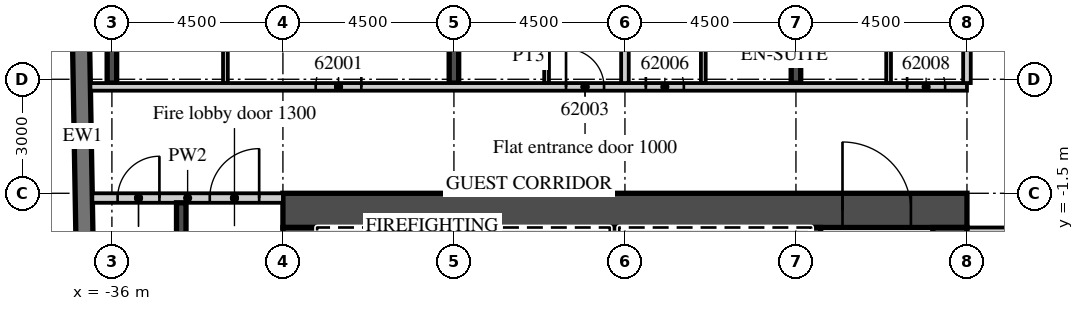
"""IFC4 building model, lengths in metres.
Left out: names, types, materials, properties, quantities, classifications, styles, units other than length and angle.
Written with IfcOpenShell. Run it as: python <this file> out.ifc"""

import sys

from ifc_helpers import new_model, si_unit, direction, frame, frame_2d, origin, place, context, subcontext, project, spatial, rectangle, extrude, element, fill, save


model = new_model("IFC4")
c1 = context("Model", 3, precision=1e-05, world=origin(), true_north=direction((0.0, 1.0)))
c2 = subcontext(c1, "Body", "Model", "MODEL_VIEW")
j1 = project(units=[si_unit("LENGTHUNIT", "METRE"), si_unit("PLANEANGLEUNIT", "RADIAN")], contexts=[c1])
p1 = place(None, origin())
s1 = spatial("IfcSite", under=j1, at=p1, CompositionType="ELEMENT")
p2 = place(p1, origin())
s2 = spatial("IfcBuilding", under=s1, at=p2, CompositionType="ELEMENT")
p3 = place(p2, frame((0.0, 0.0, 250.7)))
s3 = spatial("IfcBuildingStorey", under=s2, at=p3, CompositionType="ELEMENT", Elevation=250.7)
p4 = place(p3, frame((-36.0, 1.4, 0.0), z_axis=(0.0, 0.0, 1.0), x_axis=(0.0, 1.0, 0.0)))
e1 = element("IfcWall", 1, at=p4, inside=s3, PredefinedType="SHEAR", context=c2, shape_type="SweptSolid", body=[
    extrude(rectangle(XDim=17.125, YDim=0.25, at=frame_2d((8.563, 0.0))), origin(), (0.0, 0.0, 1.0), 3.3),
])
p5 = place(p3, frame((-27.0, 1.4, 0.0), z_axis=(0.0, 0.0, 1.0), x_axis=(0.0, 1.0, 0.0)))
e2 = element("IfcWall", 2, at=p5, inside=s3, PredefinedType="SHEAR", context=c2, shape_type="SweptSolid", body=[
    extrude(rectangle(XDim=18.817, YDim=0.25, at=frame_2d((9.409, 0.0))), origin(), (0.0, 0.0, 1.0), 3.3),
])
p6 = place(p3, frame((-18.0, 1.4, 0.0), z_axis=(0.0, 0.0, 1.0), x_axis=(0.0, 1.0, 0.0)))
e3 = element("IfcWall", 3, at=p6, inside=s3, PredefinedType="SHEAR", context=c2, shape_type="SweptSolid", body=[
    extrude(rectangle(XDim=18.974, YDim=0.25, at=frame_2d((9.487, 0.0))), origin(), (0.0, 0.0, 1.0), 3.3),
])
p7 = place(p3, frame((-37.057, 16.503, 0.0), z_axis=(0.0, 0.0, 1.0), x_axis=(0.017452279857, -0.999847697366, 0.0)))
e4 = element("IfcWall", 4, at=p7, inside=s3, PredefinedType="SOLIDWALL", context=c2, shape_type="SweptSolid", body=[
    extrude(rectangle(XDim=33.0, YDim=0.45, at=frame_2d((16.5, 0.0))), origin(), (0.0, 0.0, 1.0), 3.02),
])
p8 = place(p3, frame((-36.566, 1.3, 0.0), z_axis=(0.0, 0.0, 1.0), x_axis=(1.0, 0.0, 0.0)))
e5 = element("IfcWall", 5, at=p8, inside=s3, PredefinedType="PARTITIONING", context=c2, shape_type="SweptSolid", body=[
    extrude(rectangle(XDim=23.066, YDim=0.2, at=frame_2d((11.533, 0.0))), origin(), (0.0, 0.0, 1.0), 3.02),
])
p9 = place(p8, frame((5.929, 0.0, 0.0)))
e6 = element("IfcOpeningElement", 6, at=p9, cuts=e5, PredefinedType="OPENING", context=c2, shape_type="SweptSolid", body=[
    extrude(rectangle(XDim=1.2, YDim=2.1, at=frame_2d((0.6, 1.05))), frame((0.0, 0.11, 0.0), z_axis=(0.0, -1.0, 0.0), x_axis=(1.0, 0.0, 0.0)), (0.0, 0.0, 1.0), 0.22),
])
p10 = place(p8, frame((12.516, 0.0, 0.0)))
e7 = element("IfcOpeningElement", 7, at=p10, cuts=e5, PredefinedType="OPENING", context=c2, shape_type="SweptSolid", body=[
    extrude(rectangle(XDim=1.0, YDim=2.1, at=frame_2d((0.5, 1.05))), frame((0.0, 0.11, 0.0), z_axis=(0.0, -1.0, 0.0), x_axis=(1.0, 0.0, 0.0)), (0.0, 0.0, 1.0), 0.22),
])
p11 = place(p8, frame((14.616, 0.0, 0.0)))
e8 = element("IfcOpeningElement", 8, at=p11, cuts=e5, PredefinedType="OPENING", context=c2, shape_type="SweptSolid", body=[
    extrude(rectangle(XDim=1.0, YDim=2.1, at=frame_2d((0.5, 1.05))), frame((0.0, 0.11, 0.0), z_axis=(0.0, -1.0, 0.0), x_axis=(1.0, 0.0, 0.0)), (0.0, 0.0, 1.0), 0.22),
])
p12 = place(p8, frame((21.491, 0.0, 0.0)))
e9 = element("IfcOpeningElement", 9, at=p12, cuts=e5, PredefinedType="OPENING", context=c2, shape_type="SweptSolid", body=[
    extrude(rectangle(XDim=1.0, YDim=2.1, at=frame_2d((0.5, 1.05))), frame((0.0, 0.11, 0.0), z_axis=(0.0, -1.0, 0.0), x_axis=(1.0, 0.0, 0.0)), (0.0, 0.0, 1.0), 0.22),
])
p13 = place(p3, frame((-33.013, 1.4, 0.0), z_axis=(0.0, 0.0, 1.0), x_axis=(0.0, 1.0, 0.0)))
e10 = element("IfcWall", 10, at=p13, inside=s3, PredefinedType="PARTITIONING", context=c2, shape_type="SweptSolid", body=[
    extrude(rectangle(XDim=4.725, YDim=0.125, at=frame_2d((2.363, 0.0))), origin(), (0.0, 0.0, 1.0), 3.02),
])
p14 = place(p13, frame((2.45, 0.0, 0.0)))
e11 = element("IfcOpeningElement", 11, at=p14, cuts=e10, PredefinedType="OPENING", context=c2, shape_type="SweptSolid", body=[
    extrude(rectangle(XDim=0.9, YDim=2.1, at=frame_2d((0.45, 1.05))), frame((0.0, 0.073, 0.0), z_axis=(0.0, -1.0, 0.0), x_axis=(1.0, 0.0, 0.0)), (0.0, 0.0, 1.0), 0.145),
])
p15 = place(p3, frame((-22.5, 1.4, 0.0), z_axis=(0.0, 0.0, 1.0), x_axis=(0.0, 1.0, 0.0)))
e12 = element("IfcWall", 12, at=p15, inside=s3, PredefinedType="PARTITIONING", context=c2, shape_type="SweptSolid", body=[
    extrude(rectangle(XDim=18.908, YDim=0.2, at=frame_2d((9.454, 0.0))), origin(), (0.0, 0.0, 1.0), 3.02),
])
p16 = place(p3, frame((-24.562, 1.4, 0.0), z_axis=(0.0, 0.0, 1.0), x_axis=(0.0, 1.0, 0.0)))
e13 = element("IfcWall", 13, at=p16, inside=s3, PredefinedType="PARTITIONING", context=c2, shape_type="SweptSolid", body=[
    extrude(rectangle(XDim=4.725, YDim=0.125, at=frame_2d((2.363, 0.0))), origin(), (0.0, 0.0, 1.0), 3.02),
])
p17 = place(p16, frame((2.45, 0.0, 0.0)))
e14 = element("IfcOpeningElement", 14, at=p17, cuts=e13, PredefinedType="OPENING", context=c2, shape_type="SweptSolid", body=[
    extrude(rectangle(XDim=0.9, YDim=2.1, at=frame_2d((0.45, 1.05))), frame((0.0, 0.073, 0.0), z_axis=(0.0, -1.0, 0.0), x_axis=(1.0, 0.0, 0.0)), (0.0, 0.0, 1.0), 0.145),
])
p18 = place(p3, frame((-20.438, 1.4, 0.0), z_axis=(0.0, 0.0, 1.0), x_axis=(0.0, 1.0, 0.0)))
e15 = element("IfcWall", 15, at=p18, inside=s3, PredefinedType="PARTITIONING", context=c2, shape_type="SweptSolid", body=[
    extrude(rectangle(XDim=4.725, YDim=0.125, at=frame_2d((2.363, 0.0))), origin(), (0.0, 0.0, 1.0), 3.02),
])
p19 = place(p18, frame((2.45, 0.0, 0.0)))
e16 = element("IfcOpeningElement", 16, at=p19, cuts=e15, PredefinedType="OPENING", context=c2, shape_type="SweptSolid", body=[
    extrude(rectangle(XDim=0.9, YDim=2.1, at=frame_2d((0.45, 1.05))), frame((0.0, 0.073, 0.0), z_axis=(0.0, -1.0, 0.0), x_axis=(1.0, 0.0, 0.0)), (0.0, 0.0, 1.0), 0.145),
])
p20 = place(p3, frame((-13.5, 1.4, 0.0), z_axis=(0.0, 0.0, 1.0), x_axis=(0.0, 1.0, 0.0)))
e17 = element("IfcWall", 17, at=p20, inside=s3, PredefinedType="PARTITIONING", context=c2, shape_type="SweptSolid", body=[
    extrude(rectangle(XDim=19.065, YDim=0.2, at=frame_2d((9.533, 0.0))), origin(), (0.0, 0.0, 1.0), 3.02),
])
p21 = place(p3, frame((-15.562, 1.4, 0.0), z_axis=(0.0, 0.0, 1.0), x_axis=(0.0, 1.0, 0.0)))
e18 = element("IfcWall", 18, at=p21, inside=s3, PredefinedType="PARTITIONING", context=c2, shape_type="SweptSolid", body=[
    extrude(rectangle(XDim=4.725, YDim=0.125, at=frame_2d((2.363, 0.0))), origin(), (0.0, 0.0, 1.0), 3.02),
])
p22 = place(p21, frame((2.45, 0.0, 0.0)))
e19 = element("IfcOpeningElement", 19, at=p22, cuts=e18, PredefinedType="OPENING", context=c2, shape_type="SweptSolid", body=[
    extrude(rectangle(XDim=0.9, YDim=2.1, at=frame_2d((0.45, 1.05))), frame((0.0, 0.073, 0.0), z_axis=(0.0, -1.0, 0.0), x_axis=(1.0, 0.0, 0.0)), (0.0, 0.0, 1.0), 0.145),
])
p23 = place(p3, frame((-13.5, -2.5, 0.0), z_axis=(0.0, 0.0, 1.0), x_axis=(1.0, 0.0, 0.0)))
e20 = element("IfcWall", 20, at=p23, inside=s3, PredefinedType="PARTITIONING", context=c2, shape_type="SweptSolid", body=[
    extrude(rectangle(XDim=27.0, YDim=0.2, at=frame_2d((13.5, 0.0))), origin(), (0.0, 0.0, 1.0), 3.02),
])
p24 = place(p23, frame((2.925, 0.0, 0.0)))
e21 = element("IfcOpeningElement", 21, at=p24, cuts=e20, PredefinedType="OPENING", context=c2, shape_type="SweptSolid", body=[
    extrude(rectangle(XDim=1.0, YDim=2.1, at=frame_2d((0.5, 1.05))), frame((0.0, 0.11, 0.0), z_axis=(0.0, -1.0, 0.0), x_axis=(1.0, 0.0, 0.0)), (0.0, 0.0, 1.0), 0.22),
])
p25 = place(p23, frame((6.938, 0.0, 0.0)))
e22 = element("IfcOpeningElement", 22, at=p25, cuts=e20, PredefinedType="OPENING", context=c2, shape_type="SweptSolid", body=[
    extrude(rectangle(XDim=1.2, YDim=2.1, at=frame_2d((0.6, 1.05))), frame((0.0, 0.11, 0.0), z_axis=(0.0, -1.0, 0.0), x_axis=(1.0, 0.0, 0.0)), (0.0, 0.0, 1.0), 0.22),
])
p26 = place(p23, frame((18.862, 0.0, 0.0)))
e23 = element("IfcOpeningElement", 23, at=p26, cuts=e20, PredefinedType="OPENING", context=c2, shape_type="SweptSolid", body=[
    extrude(rectangle(XDim=1.2, YDim=2.1, at=frame_2d((0.6, 1.05))), frame((0.0, 0.11, 0.0), z_axis=(0.0, -1.0, 0.0), x_axis=(1.0, 0.0, 0.0)), (0.0, 0.0, 1.0), 0.22),
])
p27 = place(p23, frame((23.075, 0.0, 0.0)))
e24 = element("IfcOpeningElement", 24, at=p27, cuts=e20, PredefinedType="OPENING", context=c2, shape_type="SweptSolid", body=[
    extrude(rectangle(XDim=1.0, YDim=2.1, at=frame_2d((0.5, 1.05))), frame((0.0, 0.11, 0.0), z_axis=(0.0, -1.0, 0.0), x_axis=(1.0, 0.0, 0.0)), (0.0, 0.0, 1.0), 0.22),
])
p28 = place(p3, frame((-31.5, -1.95, 0.0), z_axis=(0.0, 0.0, 1.0), x_axis=(1.0, 0.0, 0.0)))
e25 = element("IfcWall", 25, at=p28, inside=s3, PredefinedType="SHEAR", context=c2, shape_type="SweptSolid", body=[
    extrude(rectangle(XDim=18.0, YDim=0.9, at=frame_2d((9.0, 0.0))), origin(), (0.0, 0.0, 1.0), 3.02),
])
p29 = place(p28, frame((14.725, 0.0, 0.0)))
e26 = element("IfcOpeningElement", 26, at=p29, cuts=e25, PredefinedType="OPENING", context=c2, shape_type="SweptSolid", body=[
    extrude(rectangle(XDim=1.8, YDim=2.1, at=frame_2d((0.9, 1.05))), frame((0.0, 0.46, 0.0), z_axis=(0.0, -1.0, 0.0), x_axis=(1.0, 0.0, 0.0)), (0.0, 0.0, 1.0), 0.92),
])
p30 = place(p3, frame((-31.05, -15.2, 0.0), z_axis=(0.0, 0.0, 1.0), x_axis=(0.0, 1.0, 0.0)))
e27 = element("IfcWall", 27, at=p30, inside=s3, PredefinedType="SHEAR", context=c2, shape_type="SweptSolid", body=[
    extrude(rectangle(XDim=12.8, YDim=0.9, at=frame_2d((6.4, 0.0))), origin(), (0.0, 0.0, 1.0), 3.02),
])
p31 = place(p30, frame((11.5, 0.0, 0.0)))
e28 = element("IfcOpeningElement", 28, at=p31, cuts=e27, PredefinedType="OPENING", context=c2, shape_type="SweptSolid", body=[
    extrude(rectangle(XDim=1.1, YDim=2.1, at=frame_2d((0.55, 1.05))), frame((0.0, 0.46, 0.0), z_axis=(0.0, -1.0, 0.0), x_axis=(1.0, 0.0, 0.0)), (0.0, 0.0, 1.0), 0.92),
])
p32 = place(p3, frame((-13.95, -14.6, 0.0), z_axis=(0.0, 0.0, 1.0), x_axis=(0.0, 1.0, 0.0)))
e29 = element("IfcWall", 29, at=p32, inside=s3, PredefinedType="SHEAR", context=c2, shape_type="SweptSolid", body=[
    extrude(rectangle(XDim=12.2, YDim=0.9, at=frame_2d((6.1, 0.0))), origin(), (0.0, 0.0, 1.0), 3.02),
])
p33 = place(p3, frame((-17.475, -5.55, 0.0), z_axis=(0.0, 0.0, 1.0), x_axis=(0.0, 1.0, 0.0)))
e30 = element("IfcWall", 30, at=p33, inside=s3, PredefinedType="SHEAR", context=c2, shape_type="SweptSolid", body=[
    extrude(rectangle(XDim=3.15, YDim=0.25, at=frame_2d((1.575, 0.0))), origin(), (0.0, 0.0, 1.0), 3.02),
])
for number, where, z_axis, x_axis in (
    (31, (-27.975, -5.3, 0.0), (0.0, 0.0, 1.0), (0.0, 1.0, 0.0)),
    (32, (-22.775, -5.3, 0.0), (0.0, 0.0, 1.0), (0.0, 1.0, 0.0)),
):
    element("IfcWall", number, at=place(p3, frame(where, z_axis=z_axis, x_axis=x_axis)), inside=s3, PredefinedType="SHEAR", context=c2, shape_type="SweptSolid", body=[
        extrude(rectangle(XDim=2.9, YDim=0.25, at=frame_2d((1.45, 0.0))), origin(), (0.0, 0.0, 1.0), 3.02),
    ])
p34 = place(p3, frame((-36.515, -1.625, 0.0), z_axis=(0.0, 0.0, 1.0), x_axis=(1.0, 0.0, 0.0)))
e33 = element("IfcWall", 33, at=p34, inside=s3, PredefinedType="PARTITIONING", context=c2, shape_type="SweptSolid", body=[
    extrude(rectangle(XDim=5.015, YDim=0.25, at=frame_2d((2.508, 0.0))), origin(), (0.0, 0.0, 1.0), 3.02),
])
p35 = place(p34, frame((3.09, 0.0, 0.0)))
e34 = element("IfcOpeningElement", 34, at=p35, cuts=e33, PredefinedType="OPENING", context=c2, shape_type="SweptSolid", body=[
    extrude(rectangle(XDim=1.3, YDim=2.1, at=frame_2d((0.65, 1.05))), frame((0.0, 0.135, 0.0), z_axis=(0.0, -1.0, 0.0), x_axis=(1.0, 0.0, 0.0)), (0.0, 0.0, 1.0), 0.27),
])
p36 = place(p34, frame((0.665, 0.0, 0.0)))
e35 = element("IfcOpeningElement", 35, at=p36, cuts=e33, PredefinedType="OPENING", context=c2, shape_type="SweptSolid", body=[
    extrude(rectangle(XDim=1.1, YDim=2.1, at=frame_2d((0.55, 1.05))), frame((0.0, 0.135, 0.0), z_axis=(0.0, -1.0, 0.0), x_axis=(1.0, 0.0, 0.0)), (0.0, 0.0, 1.0), 0.27),
])
p37 = place(p3, frame((-34.175, -10.1, 0.0), z_axis=(0.0, 0.0, 1.0), x_axis=(0.0, 1.0, 0.0)))
e36 = element("IfcWall", 36, at=p37, inside=s3, PredefinedType="SHEAR", context=c2, shape_type="SweptSolid", body=[
    extrude(rectangle(XDim=8.35, YDim=0.25, at=frame_2d((4.175, 0.0))), origin(), (0.0, 0.0, 1.0), 3.02),
])
p38 = place(p9, origin())
e37 = element("IfcDoor", 37, at=p38, inside=s3, OperationType="SINGLE_SWING_RIGHT", PredefinedType="DOOR", context=c2, shape_type="SweptSolid", body=[
    extrude(rectangle(XDim=1.2, YDim=2.1, at=frame_2d((0.6, 1.05))), frame((0.0, 0.025, 0.0), z_axis=(0.0, -1.0, 0.0), x_axis=(1.0, 0.0, 0.0)), (0.0, 0.0, 1.0), 0.05),
])
fill(e6, e37)
p39 = place(p10, origin())
e38 = element("IfcDoor", 38, at=p39, inside=s3, OperationType="SINGLE_SWING_LEFT", PredefinedType="DOOR", context=c2, shape_type="SweptSolid", body=[
    extrude(rectangle(XDim=1.0, YDim=2.1, at=frame_2d((0.5, 1.05))), frame((0.0, 0.025, 0.0), z_axis=(0.0, -1.0, 0.0), x_axis=(1.0, 0.0, 0.0)), (0.0, 0.0, 1.0), 0.05),
])
fill(e7, e38)
p40 = place(p11, origin())
e39 = element("IfcDoor", 39, at=p40, inside=s3, OperationType="SINGLE_SWING_LEFT", PredefinedType="DOOR", context=c2, shape_type="SweptSolid", body=[
    extrude(rectangle(XDim=1.0, YDim=2.1, at=frame_2d((0.5, 1.05))), frame((0.0, 0.025, 0.0), z_axis=(0.0, -1.0, 0.0), x_axis=(1.0, 0.0, 0.0)), (0.0, 0.0, 1.0), 0.05),
])
fill(e8, e39)
p41 = place(p12, origin())
e40 = element("IfcDoor", 40, at=p41, inside=s3, OperationType="SINGLE_SWING_LEFT", PredefinedType="DOOR", context=c2, shape_type="SweptSolid", body=[
    extrude(rectangle(XDim=1.0, YDim=2.1, at=frame_2d((0.5, 1.05))), frame((0.0, 0.025, 0.0), z_axis=(0.0, -1.0, 0.0), x_axis=(1.0, 0.0, 0.0)), (0.0, 0.0, 1.0), 0.05),
])
fill(e9, e40)
p42 = place(p29, origin())
e41 = element("IfcDoor", 41, at=p42, inside=s3, OperationType="DOUBLE_DOOR_DOUBLE_SWING", PredefinedType="DOOR", context=c2, shape_type="SweptSolid", body=[
    extrude(rectangle(XDim=1.8, YDim=2.1, at=frame_2d((0.9, 1.05))), frame((0.0, 0.025, 0.0), z_axis=(0.0, -1.0, 0.0), x_axis=(1.0, 0.0, 0.0)), (0.0, 0.0, 1.0), 0.05),
])
fill(e26, e41)
p43 = place(p35, origin())
e42 = element("IfcDoor", 42, at=p43, inside=s3, OperationType="SINGLE_SWING_RIGHT", PredefinedType="DOOR", context=c2, shape_type="SweptSolid", body=[
    extrude(rectangle(XDim=1.3, YDim=2.1, at=frame_2d((0.65, 1.05))), frame((0.0, 0.025, 0.0), z_axis=(0.0, -1.0, 0.0), x_axis=(1.0, 0.0, 0.0)), (0.0, 0.0, 1.0), 0.05),
])
fill(e34, e42)
p44 = place(p36, origin())
e43 = element("IfcDoor", 43, at=p44, inside=s3, OperationType="SINGLE_SWING_RIGHT", PredefinedType="DOOR", context=c2, shape_type="SweptSolid", body=[
    extrude(rectangle(XDim=1.1, YDim=2.1, at=frame_2d((0.55, 1.05))), frame((0.0, 0.025, 0.0), z_axis=(0.0, -1.0, 0.0), x_axis=(1.0, 0.0, 0.0)), (0.0, 0.0, 1.0), 0.05),
])
fill(e35, e43)
save(model, sys.argv[1])
